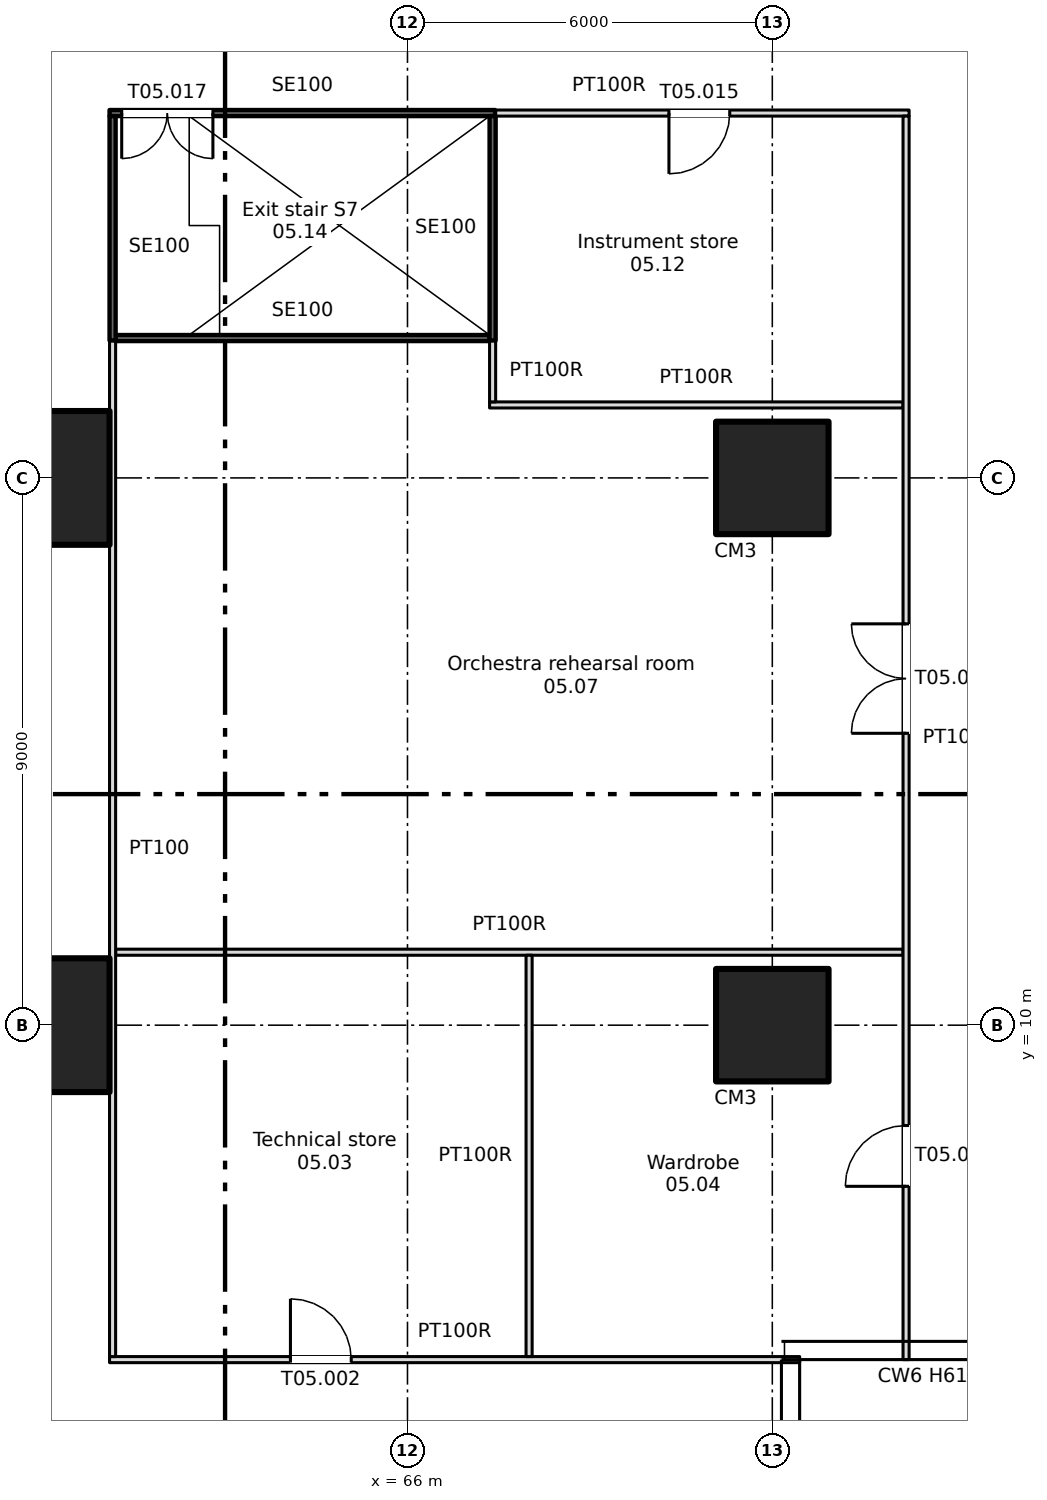
"""IFC4 building model, lengths in metres.
Left out: names, types, materials, properties, quantities, classifications, styles, units other than length and angle.
Written with IfcOpenShell. Run it as: python <this file> out.ifc"""

import sys

from ifc_helpers import new_model, si_unit, direction, frame, frame_2d, origin, origin_2d, place, context, subcontext, project, spatial, rectangle, extrude, element, fill, save


model = new_model("IFC4")
c1 = context("Model", 3, precision=1e-05, world=origin(), true_north=direction((0.0, 1.0)))
c2 = subcontext(c1, "Body", "Model", "MODEL_VIEW")
j1 = project(units=[si_unit("LENGTHUNIT", "METRE"), si_unit("PLANEANGLEUNIT", "RADIAN")], contexts=[c1])
p1 = place(None, origin())
s1 = spatial("IfcSite", under=j1, at=p1, CompositionType="ELEMENT")
p2 = place(p1, origin())
s2 = spatial("IfcBuilding", under=s1, at=p2, CompositionType="ELEMENT")
p3 = place(p2, frame((0.0, 0.0, 11.3)))
s3 = spatial("IfcBuildingStorey", under=s2, at=p3, CompositionType="ELEMENT", Elevation=11.3)
for number, where, z_axis, x_axis in (
    (1, (60.0, 10.0, 0.0), (0.0, 0.0, 1.0), (1.0, 0.0, 0.0)),
    (2, (60.0, 19.0, 0.0), (0.0, 0.0, 1.0), (1.0, 0.0, 0.0)),
):
    element("IfcColumn", number, at=place(p3, frame(where, z_axis=z_axis, x_axis=x_axis)), inside=s3, PredefinedType="COLUMN", context=c2, shape_type="SweptSolid", body=[
        extrude(rectangle(XDim=2.2, YDim=2.2, at=origin_2d()), origin(), (0.0, 0.0, 1.0), 6.1),
    ])
for number, where, z_axis, x_axis in (
    (3, (72.0, 10.0, 0.0), (0.0, 0.0, 1.0), (1.0, 0.0, 0.0)),
    (4, (72.0, 19.0, 0.0), (0.0, 0.0, 1.0), (1.0, 0.0, 0.0)),
):
    element("IfcColumn", number, at=place(p3, frame(where, z_axis=z_axis, x_axis=x_axis)), inside=s3, PredefinedType="COLUMN", context=c2, shape_type="SweptSolid", body=[
        extrude(rectangle(XDim=1.85, YDim=1.85, at=origin_2d()), origin(), (0.0, 0.0, 1.0), 6.1),
    ])
p4 = place(p3, frame((61.1, 4.5, 0.0), z_axis=(0.0, 0.0, 1.0), x_axis=(1.0, 0.0, 0.0)))
e5 = element("IfcWall", 5, at=p4, inside=s3, PredefinedType="PARTITIONING", context=c2, shape_type="SweptSolid", body=[
    extrude(rectangle(XDim=11.35, YDim=0.1, at=frame_2d((5.675, 0.0))), origin(), (0.0, 0.0, 1.0), 6.1),
])
p5 = place(p4, frame((2.975, 0.0, 0.0)))
e6 = element("IfcOpeningElement", 6, at=p5, cuts=e5, PredefinedType="OPENING", context=c2, shape_type="SweptSolid", body=[
    extrude(rectangle(XDim=1.0, YDim=2.1, at=frame_2d((0.5, 1.05))), frame((0.0, 0.06, 0.0), z_axis=(0.0, -1.0, 0.0), x_axis=(1.0, 0.0, 0.0)), (0.0, 0.0, 1.0), 0.12),
])
p6 = place(p3, frame((61.2, 11.2, 0.0), z_axis=(0.0, 0.0, 1.0), x_axis=(1.0, 0.0, 0.0)))
e7 = element("IfcWall", 7, at=p6, inside=s3, PredefinedType="PARTITIONING", context=c2, shape_type="SweptSolid", body=[
    extrude(rectangle(XDim=12.95, YDim=0.1, at=frame_2d((6.475, 0.0))), origin(), (0.0, 0.0, 1.0), 6.1),
])
p7 = place(p3, frame((67.35, 20.2, 0.0), z_axis=(0.0, 0.0, 1.0), x_axis=(1.0, 0.0, 0.0)))
e8 = element("IfcWall", 8, at=p7, inside=s3, PredefinedType="PARTITIONING", context=c2, shape_type="SweptSolid", body=[
    extrude(rectangle(XDim=6.8, YDim=0.1, at=frame_2d((3.4, 0.0))), origin(), (0.0, 0.0, 1.0), 6.1),
])
p8 = place(p3, frame((61.2, 21.3, 0.0), z_axis=(0.0, 0.0, 1.0), x_axis=(1.0, 0.0, 0.0)))
e9 = element("IfcWall", 9, at=p8, inside=s3, PredefinedType="SOLIDWALL", context=c2, shape_type="SweptSolid", body=[
    extrude(rectangle(XDim=6.15, YDim=0.1, at=frame_2d((3.075, 0.0))), origin(), (0.0, 0.0, 1.0), 6.1),
])
p9 = place(p3, frame((61.1, 25.0, 0.0), z_axis=(0.0, 0.0, 1.0), x_axis=(1.0, 0.0, 0.0)))
e10 = element("IfcWall", 10, at=p9, inside=s3, PredefinedType="SOLIDWALL", context=c2, shape_type="SweptSolid", body=[
    extrude(rectangle(XDim=6.34, YDim=0.1, at=frame_2d((3.17, 0.0))), origin(), (0.0, 0.0, 1.0), 6.1),
])
p10 = place(p9, frame((0.2, 0.0, 0.0)))
e11 = element("IfcOpeningElement", 11, at=p10, cuts=e10, PredefinedType="OPENING", context=c2, shape_type="SweptSolid", body=[
    extrude(rectangle(XDim=1.5, YDim=2.1, at=frame_2d((0.75, 1.05))), frame((0.0, 0.06, 0.0), z_axis=(0.0, -1.0, 0.0), x_axis=(1.0, 0.0, 0.0)), (0.0, 0.0, 1.0), 0.12),
])
p11 = place(p3, frame((67.44, 25.0, 0.0), z_axis=(0.0, 0.0, 1.0), x_axis=(1.0, 0.0, 0.0)))
e12 = element("IfcWall", 12, at=p11, inside=s3, PredefinedType="PARTITIONING", context=c2, shape_type="SweptSolid", body=[
    extrude(rectangle(XDim=6.81, YDim=0.1, at=frame_2d((3.405, 0.0))), origin(), (0.0, 0.0, 1.0), 6.1),
])
p12 = place(p11, frame((2.86, 0.0, 0.0)))
e13 = element("IfcOpeningElement", 13, at=p12, cuts=e12, PredefinedType="OPENING", context=c2, shape_type="SweptSolid", body=[
    extrude(rectangle(XDim=1.0, YDim=2.1, at=frame_2d((0.5, 1.05))), frame((0.0, 0.06, 0.0), z_axis=(0.0, -1.0, 0.0), x_axis=(1.0, 0.0, 0.0)), (0.0, 0.0, 1.0), 0.12),
])
p13 = place(p3, frame((61.15, 4.55, 0.0), z_axis=(0.0, 0.0, 1.0), x_axis=(0.0, 1.0, 0.0)))
e14 = element("IfcWall", 14, at=p13, inside=s3, PredefinedType="PARTITIONING", context=c2, shape_type="SweptSolid", body=[
    extrude(rectangle(XDim=16.71, YDim=0.1, at=frame_2d((8.355, 0.0))), origin(), (0.0, 0.0, 1.0), 6.1),
])
p14 = place(p3, frame((61.15, 21.26, 0.0), z_axis=(0.0, 0.0, 1.0), x_axis=(0.0, 1.0, 0.0)))
e15 = element("IfcWall", 15, at=p14, inside=s3, PredefinedType="SOLIDWALL", context=c2, shape_type="SweptSolid", body=[
    extrude(rectangle(XDim=3.69, YDim=0.1, at=frame_2d((1.845, 0.0))), origin(), (0.0, 0.0, 1.0), 6.1),
])
p15 = place(p3, frame((67.4, 20.25, 0.0), z_axis=(0.0, 0.0, 1.0), x_axis=(0.0, 1.0, 0.0)))
e16 = element("IfcWall", 16, at=p15, inside=s3, PredefinedType="PARTITIONING", context=c2, shape_type="SweptSolid", body=[
    extrude(rectangle(XDim=1.01, YDim=0.1, at=frame_2d((0.505, 0.0))), origin(), (0.0, 0.0, 1.0), 6.1),
])
p16 = place(p3, frame((67.4, 21.26, 0.0), z_axis=(0.0, 0.0, 1.0), x_axis=(0.0, 1.0, 0.0)))
e17 = element("IfcWall", 17, at=p16, inside=s3, PredefinedType="SOLIDWALL", context=c2, shape_type="SweptSolid", body=[
    extrude(rectangle(XDim=3.69, YDim=0.1, at=frame_2d((1.845, 0.0))), origin(), (0.0, 0.0, 1.0), 6.1),
])
p17 = place(p3, frame((68.0, 4.55, 0.0), z_axis=(0.0, 0.0, 1.0), x_axis=(0.0, 1.0, 0.0)))
e18 = element("IfcWall", 18, at=p17, inside=s3, PredefinedType="PARTITIONING", context=c2, shape_type="SweptSolid", body=[
    extrude(rectangle(XDim=6.6, YDim=0.1, at=frame_2d((3.3, 0.0))), origin(), (0.0, 0.0, 1.0), 6.1),
])
p18 = place(p3, frame((74.2, 4.5, 0.0), z_axis=(0.0, 0.0, 1.0), x_axis=(0.0, 1.0, 0.0)))
e19 = element("IfcWall", 19, at=p18, inside=s3, PredefinedType="PARTITIONING", context=c2, shape_type="SweptSolid", body=[
    extrude(rectangle(XDim=20.45, YDim=0.1, at=frame_2d((10.225, 0.0))), origin(), (0.0, 0.0, 1.0), 6.1),
])
p19 = place(p18, frame((2.85, 0.0, 0.0)))
e20 = element("IfcOpeningElement", 20, at=p19, cuts=e19, PredefinedType="OPENING", context=c2, shape_type="SweptSolid", body=[
    extrude(rectangle(XDim=1.0, YDim=2.1, at=frame_2d((0.5, 1.05))), frame((0.0, 0.06, 0.0), z_axis=(0.0, -1.0, 0.0), x_axis=(1.0, 0.0, 0.0)), (0.0, 0.0, 1.0), 0.12),
])
p20 = place(p18, frame((10.3, 0.0, 0.0)))
e21 = element("IfcOpeningElement", 21, at=p20, cuts=e19, PredefinedType="OPENING", context=c2, shape_type="SweptSolid", body=[
    extrude(rectangle(XDim=1.8, YDim=2.1, at=frame_2d((0.9, 1.05))), frame((0.0, 0.06, 0.0), z_axis=(0.0, -1.0, 0.0), x_axis=(1.0, 0.0, 0.0)), (0.0, 0.0, 1.0), 0.12),
])
p21 = place(p5, origin())
e22 = element("IfcDoor", 22, at=p21, inside=s3, OperationType="SINGLE_SWING_LEFT", PredefinedType="DOOR", context=c2, shape_type="SweptSolid", body=[
    extrude(rectangle(XDim=1.0, YDim=2.1, at=frame_2d((0.5, 1.05))), frame((0.0, 0.025, 0.0), z_axis=(0.0, -1.0, 0.0), x_axis=(1.0, 0.0, 0.0)), (0.0, 0.0, 1.0), 0.05),
])
fill(e6, e22)
p22 = place(p19, origin())
e23 = element("IfcDoor", 23, at=p22, inside=s3, OperationType="SINGLE_SWING_LEFT", PredefinedType="DOOR", context=c2, shape_type="SweptSolid", body=[
    extrude(rectangle(XDim=1.0, YDim=2.1, at=frame_2d((0.5, 1.05))), frame((0.0, 0.025, 0.0), z_axis=(0.0, -1.0, 0.0), x_axis=(1.0, 0.0, 0.0)), (0.0, 0.0, 1.0), 0.05),
])
fill(e20, e23)
p23 = place(p20, origin())
e24 = element("IfcDoor", 24, at=p23, inside=s3, OperationType="DOUBLE_DOOR_SINGLE_SWING", PredefinedType="DOOR", context=c2, shape_type="SweptSolid", body=[
    extrude(rectangle(XDim=1.8, YDim=2.1, at=frame_2d((0.9, 1.05))), frame((0.0, 0.025, 0.0), z_axis=(0.0, -1.0, 0.0), x_axis=(1.0, 0.0, 0.0)), (0.0, 0.0, 1.0), 0.05),
])
fill(e21, e24)
p24 = place(p12, origin())
e25 = element("IfcDoor", 25, at=p24, inside=s3, OperationType="SINGLE_SWING_LEFT", PredefinedType="DOOR", context=c2, shape_type="SweptSolid", body=[
    extrude(rectangle(XDim=1.0, YDim=2.1, at=frame_2d((0.5, 1.05))), frame((0.0, 0.025, 0.0), z_axis=(0.0, -1.0, 0.0), x_axis=(1.0, 0.0, 0.0)), (0.0, 0.0, 1.0), 0.05),
])
fill(e13, e25)
p25 = place(p10, origin())
e26 = element("IfcDoor", 26, at=p25, inside=s3, OperationType="DOUBLE_DOOR_SINGLE_SWING", PredefinedType="DOOR", context=c2, shape_type="SweptSolid", body=[
    extrude(rectangle(XDim=1.5, YDim=2.1, at=frame_2d((0.75, 1.05))), frame((0.0, 0.025, 0.0), z_axis=(0.0, -1.0, 0.0), x_axis=(1.0, 0.0, 0.0)), (0.0, 0.0, 1.0), 0.05),
])
fill(e11, e26)
save(model, sys.argv[1])
